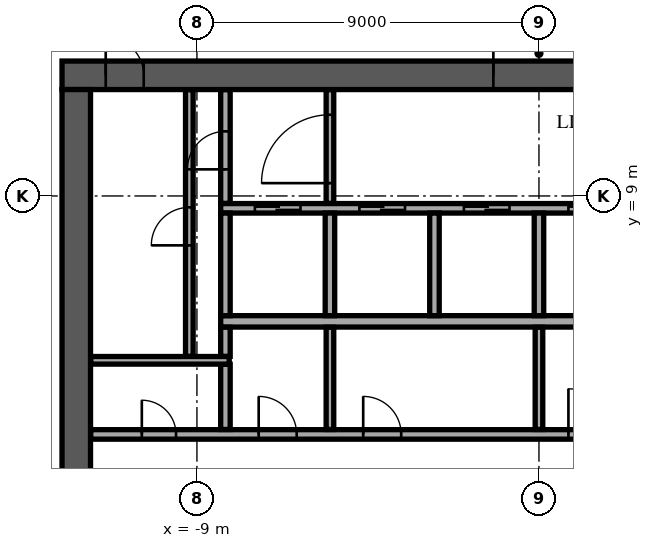
"""IFC4 building model, lengths in metres.
Left out: names, types, materials, properties, quantities, classifications, styles, units other than length and angle.
Written with IfcOpenShell. Run it as: python <this file> out.ifc"""

import sys

from ifc_helpers import new_model, si_unit, direction, frame, frame_2d, origin, place, context, subcontext, project, spatial, rectangle, extrude, element, fill, save


model = new_model("IFC4")
c1 = context("Model", 3, precision=1e-05, world=origin(), true_north=direction((0.0, 1.0)))
c2 = subcontext(c1, "Body", "Model", "MODEL_VIEW")
j1 = project(units=[si_unit("LENGTHUNIT", "METRE"), si_unit("PLANEANGLEUNIT", "RADIAN")], contexts=[c1])
p1 = place(None, origin())
s1 = spatial("IfcSite", under=j1, at=p1, CompositionType="ELEMENT")
p2 = place(p1, origin())
s2 = spatial("IfcBuilding", under=s1, at=p2, CompositionType="ELEMENT")
p3 = place(p2, frame((0.0, 0.0, 282.9)))
s3 = spatial("IfcBuildingStorey", under=s2, at=p3, CompositionType="ELEMENT", Elevation=282.9)
p4 = place(p3, frame((-12.55, 12.175, 0.0), z_axis=(0.0, 0.0, 1.0), x_axis=(1.0, 0.0, 0.0)))
e1 = element("IfcWall", 1, at=p4, inside=s3, PredefinedType="SHEAR", context=c2, shape_type="SweptSolid", body=[
    extrude(rectangle(XDim=25.1, YDim=0.75, at=frame_2d((12.55, 0.0))), origin(), (0.0, 0.0, 1.0), 3.64),
])
p5 = place(p4, frame((11.35, 0.0, 0.0)))
e2 = element("IfcOpeningElement", 2, at=p5, cuts=e1, PredefinedType="OPENING", context=c2, shape_type="SweptSolid", body=[
    extrude(rectangle(XDim=2.4, YDim=2.4, at=frame_2d((1.2, 1.2))), frame((0.0, 0.385, 0.0), z_axis=(0.0, -1.0, 0.0), x_axis=(1.0, 0.0, 0.0)), (0.0, 0.0, 1.0), 0.77),
])
p6 = place(p4, frame((22.175, 0.0, 0.0)))
e3 = element("IfcOpeningElement", 3, at=p6, cuts=e1, PredefinedType="OPENING", context=c2, shape_type="SweptSolid", body=[
    extrude(rectangle(XDim=1.2, YDim=2.1, at=frame_2d((0.6, 1.05))), frame((0.0, 0.385, 0.0), z_axis=(0.0, -1.0, 0.0), x_axis=(1.0, 0.0, 0.0)), (0.0, 0.0, 1.0), 0.77),
])
p7 = place(p4, frame((1.15, 0.0, 0.0)))
e4 = element("IfcOpeningElement", 4, at=p7, cuts=e1, PredefinedType="OPENING", context=c2, shape_type="SweptSolid", body=[
    extrude(rectangle(XDim=1.0, YDim=2.1, at=frame_2d((0.5, 1.05))), frame((0.0, 0.385, 0.0), z_axis=(0.0, -1.0, 0.0), x_axis=(1.0, 0.0, 0.0)), (0.0, 0.0, 1.0), 0.77),
])
p8 = place(p3, frame((-12.175, -11.8, 0.0), z_axis=(0.0, 0.0, 1.0), x_axis=(0.0, 1.0, 0.0)))
e5 = element("IfcWall", 5, at=p8, inside=s3, PredefinedType="SHEAR", context=c2, shape_type="SweptSolid", body=[
    extrude(rectangle(XDim=23.6, YDim=0.75, at=frame_2d((11.8, 0.0))), origin(), (0.0, 0.0, 1.0), 3.64),
])
p9 = place(p8, frame((10.6, 0.0, 0.0)))
e6 = element("IfcOpeningElement", 6, at=p9, cuts=e5, PredefinedType="OPENING", context=c2, shape_type="SweptSolid", body=[
    extrude(rectangle(XDim=2.4, YDim=2.4, at=frame_2d((1.2, 1.2))), frame((0.0, 0.385, 0.0), z_axis=(0.0, -1.0, 0.0), x_axis=(1.0, 0.0, 0.0)), (0.0, 0.0, 1.0), 0.77),
])
p10 = place(p3, frame((-8.375, 5.7, 0.0), z_axis=(0.0, 0.0, 1.0), x_axis=(1.0, 0.0, 0.0)))
e7 = element("IfcWall", 7, at=p10, inside=s3, PredefinedType="SOLIDWALL", context=c2, shape_type="SweptSolid", body=[
    extrude(rectangle(XDim=16.75, YDim=0.3, at=frame_2d((8.375, 0.0))), origin(), (0.0, 0.0, 1.0), 3.64),
])
p11 = place(p3, frame((-8.375, 8.675, 0.0), z_axis=(0.0, 0.0, 1.0), x_axis=(1.0, 0.0, 0.0)))
e8 = element("IfcWall", 8, at=p11, inside=s3, PredefinedType="SOLIDWALL", context=c2, shape_type="SweptSolid", body=[
    extrude(rectangle(XDim=16.75, YDim=0.25, at=frame_2d((8.375, 0.0))), origin(), (0.0, 0.0, 1.0), 3.64),
])
p12 = place(p11, frame((0.9, 0.0, 0.0)))
e9 = element("IfcOpeningElement", 9, at=p12, cuts=e8, PredefinedType="OPENING", context=c2, shape_type="SweptSolid", body=[
    extrude(rectangle(XDim=1.2, YDim=2.1, at=frame_2d((0.6, 1.05))), frame((0.0, 0.135, 0.0), z_axis=(0.0, -1.0, 0.0), x_axis=(1.0, 0.0, 0.0)), (0.0, 0.0, 1.0), 0.27),
])
p13 = place(p11, frame((3.65, 0.0, 0.0)))
e10 = element("IfcOpeningElement", 10, at=p13, cuts=e8, PredefinedType="OPENING", context=c2, shape_type="SweptSolid", body=[
    extrude(rectangle(XDim=1.2, YDim=2.1, at=frame_2d((0.6, 1.05))), frame((0.0, 0.135, 0.0), z_axis=(0.0, -1.0, 0.0), x_axis=(1.0, 0.0, 0.0)), (0.0, 0.0, 1.0), 0.27),
])
p14 = place(p11, frame((6.4, 0.0, 0.0)))
e11 = element("IfcOpeningElement", 11, at=p14, cuts=e8, PredefinedType="OPENING", context=c2, shape_type="SweptSolid", body=[
    extrude(rectangle(XDim=1.2, YDim=2.1, at=frame_2d((0.6, 1.05))), frame((0.0, 0.135, 0.0), z_axis=(0.0, -1.0, 0.0), x_axis=(1.0, 0.0, 0.0)), (0.0, 0.0, 1.0), 0.27),
])
p15 = place(p11, frame((9.15, 0.0, 0.0)))
e12 = element("IfcOpeningElement", 12, at=p15, cuts=e8, PredefinedType="OPENING", context=c2, shape_type="SweptSolid", body=[
    extrude(rectangle(XDim=1.2, YDim=2.1, at=frame_2d((0.6, 1.05))), frame((0.0, 0.135, 0.0), z_axis=(0.0, -1.0, 0.0), x_axis=(1.0, 0.0, 0.0)), (0.0, 0.0, 1.0), 0.27),
])
p16 = place(p11, frame((11.9, 0.0, 0.0)))
e13 = element("IfcOpeningElement", 13, at=p16, cuts=e8, PredefinedType="OPENING", context=c2, shape_type="SweptSolid", body=[
    extrude(rectangle(XDim=1.2, YDim=2.1, at=frame_2d((0.6, 1.05))), frame((0.0, 0.135, 0.0), z_axis=(0.0, -1.0, 0.0), x_axis=(1.0, 0.0, 0.0)), (0.0, 0.0, 1.0), 0.27),
])
p17 = place(p11, frame((14.65, 0.0, 0.0)))
e14 = element("IfcOpeningElement", 14, at=p17, cuts=e8, PredefinedType="OPENING", context=c2, shape_type="SweptSolid", body=[
    extrude(rectangle(XDim=1.2, YDim=2.1, at=frame_2d((0.6, 1.05))), frame((0.0, 0.135, 0.0), z_axis=(0.0, -1.0, 0.0), x_axis=(1.0, 0.0, 0.0)), (0.0, 0.0, 1.0), 0.27),
])
for number, where, z_axis, x_axis in (
    (15, (-8.25, 5.85, 0.0), (0.0, 0.0, 1.0), (0.0, 1.0, 0.0)),
    (16, (-5.5, 5.85, 0.0), (0.0, 0.0, 1.0), (0.0, 1.0, 0.0)),
    (17, (-2.75, 5.85, 0.0), (0.0, 0.0, 1.0), (0.0, 1.0, 0.0)),
    (18, (0.0, 5.85, 0.0), (0.0, 0.0, 1.0), (0.0, 1.0, 0.0)),
):
    element("IfcWall", number, at=place(p3, frame(where, z_axis=z_axis, x_axis=x_axis)), inside=s3, PredefinedType="SOLIDWALL", context=c2, shape_type="SweptSolid", body=[
        extrude(rectangle(XDim=2.7, YDim=0.25, at=frame_2d((1.35, 0.0))), origin(), (0.0, 0.0, 1.0), 3.64),
    ])
p18 = place(p3, frame((-11.795, 2.725, 0.0), z_axis=(0.0, 0.0, 1.0), x_axis=(1.0, 0.0, 0.0)))
e19 = element("IfcWall", 19, at=p18, inside=s3, PredefinedType="PARTITIONING", context=c2, shape_type="SweptSolid", body=[
    extrude(rectangle(XDim=23.59, YDim=0.25, at=frame_2d((11.795, 0.0))), origin(), (0.0, 0.0, 1.0), 3.64),
])
p19 = place(p18, frame((21.345, 0.0, 0.0)))
e20 = element("IfcOpeningElement", 20, at=p19, cuts=e19, PredefinedType="OPENING", context=c2, shape_type="SweptSolid", body=[
    extrude(rectangle(XDim=0.9, YDim=2.1, at=frame_2d((0.45, 1.05))), frame((0.0, 0.135, 0.0), z_axis=(0.0, -1.0, 0.0), x_axis=(1.0, 0.0, 0.0)), (0.0, 0.0, 1.0), 0.27),
])
p20 = place(p18, frame((1.345, 0.0, 0.0)))
e21 = element("IfcOpeningElement", 21, at=p20, cuts=e19, PredefinedType="OPENING", context=c2, shape_type="SweptSolid", body=[
    extrude(rectangle(XDim=0.9, YDim=2.1, at=frame_2d((0.45, 1.05))), frame((0.0, 0.135, 0.0), z_axis=(0.0, -1.0, 0.0), x_axis=(1.0, 0.0, 0.0)), (0.0, 0.0, 1.0), 0.27),
])
p21 = place(p18, frame((4.42, 0.0, 0.0)))
e22 = element("IfcOpeningElement", 22, at=p21, cuts=e19, PredefinedType="OPENING", context=c2, shape_type="SweptSolid", body=[
    extrude(rectangle(XDim=1.0, YDim=2.1, at=frame_2d((0.5, 1.05))), frame((0.0, 0.135, 0.0), z_axis=(0.0, -1.0, 0.0), x_axis=(1.0, 0.0, 0.0)), (0.0, 0.0, 1.0), 0.27),
])
p22 = place(p18, frame((7.17, 0.0, 0.0)))
e23 = element("IfcOpeningElement", 23, at=p22, cuts=e19, PredefinedType="OPENING", context=c2, shape_type="SweptSolid", body=[
    extrude(rectangle(XDim=1.0, YDim=2.1, at=frame_2d((0.5, 1.05))), frame((0.0, 0.135, 0.0), z_axis=(0.0, -1.0, 0.0), x_axis=(1.0, 0.0, 0.0)), (0.0, 0.0, 1.0), 0.27),
])
p23 = place(p18, frame((12.57, 0.0, 0.0)))
e24 = element("IfcOpeningElement", 24, at=p23, cuts=e19, PredefinedType="OPENING", context=c2, shape_type="SweptSolid", body=[
    extrude(rectangle(XDim=1.2, YDim=2.1, at=frame_2d((0.6, 1.05))), frame((0.0, 0.135, 0.0), z_axis=(0.0, -1.0, 0.0), x_axis=(1.0, 0.0, 0.0)), (0.0, 0.0, 1.0), 0.27),
])
p24 = place(p3, frame((-8.25, 2.855, 0.0), z_axis=(0.0, 0.0, 1.0), x_axis=(0.0, 1.0, 0.0)))
e25 = element("IfcWall", 25, at=p24, inside=s3, PredefinedType="PARTITIONING", context=c2, shape_type="SweptSolid", body=[
    extrude(rectangle(XDim=1.715, YDim=0.25, at=frame_2d((0.857, 0.0))), origin(), (0.0, 0.0, 1.0), 3.64),
])
for number, where, z_axis, x_axis in (
    (26, (-5.5, 2.855, 0.0), (0.0, 0.0, 1.0), (0.0, 1.0, 0.0)),
    (27, (0.0, 2.855, 0.0), (0.0, 0.0, 1.0), (0.0, 1.0, 0.0)),
):
    element("IfcWall", number, at=place(p3, frame(where, z_axis=z_axis, x_axis=x_axis)), inside=s3, PredefinedType="PARTITIONING", context=c2, shape_type="SweptSolid", body=[
        extrude(rectangle(XDim=2.69, YDim=0.2, at=frame_2d((1.345, 0.0))), origin(), (0.0, 0.0, 1.0), 3.64),
    ])
p25 = place(p3, frame((-11.795, 4.675, 0.0), z_axis=(0.0, 0.0, 1.0), x_axis=(1.0, 0.0, 0.0)))
e28 = element("IfcWall", 28, at=p25, inside=s3, PredefinedType="PARTITIONING", context=c2, shape_type="SweptSolid", body=[
    extrude(rectangle(XDim=3.645, YDim=0.2, at=frame_2d((1.823, 0.0))), origin(), (0.0, 0.0, 1.0), 3.64),
])
p26 = place(p3, frame((-9.2, 4.78, 0.0), z_axis=(0.0, 0.0, 1.0), x_axis=(0.0, 1.0, 0.0)))
e29 = element("IfcWall", 29, at=p26, inside=s3, PredefinedType="PARTITIONING", context=c2, shape_type="SweptSolid", body=[
    extrude(rectangle(XDim=7.015, YDim=0.2, at=frame_2d((3.507, 0.0))), origin(), (0.0, 0.0, 1.0), 3.64),
])
p27 = place(p26, frame((2.92, 0.0, 0.0)))
e30 = element("IfcOpeningElement", 30, at=p27, cuts=e29, PredefinedType="OPENING", context=c2, shape_type="SweptSolid", body=[
    extrude(rectangle(XDim=1.0, YDim=2.1, at=frame_2d((0.5, 1.05))), frame((0.0, 0.11, 0.0), z_axis=(0.0, -1.0, 0.0), x_axis=(1.0, 0.0, 0.0)), (0.0, 0.0, 1.0), 0.22),
])
p28 = place(p3, frame((-8.25, 4.78, 0.0), z_axis=(0.0, 0.0, 1.0), x_axis=(0.0, 1.0, 0.0)))
e31 = element("IfcWall", 31, at=p28, inside=s3, PredefinedType="PARTITIONING", context=c2, shape_type="SweptSolid", body=[
    extrude(rectangle(XDim=0.765, YDim=0.25, at=frame_2d((0.382, 0.0))), origin(), (0.0, 0.0, 1.0), 3.64),
])
p29 = place(p3, frame((-8.25, 8.805, 0.0), z_axis=(0.0, 0.0, 1.0), x_axis=(0.0, 1.0, 0.0)))
e32 = element("IfcWall", 32, at=p29, inside=s3, PredefinedType="PARTITIONING", context=c2, shape_type="SweptSolid", body=[
    extrude(rectangle(XDim=2.99, YDim=0.25, at=frame_2d((1.495, 0.0))), origin(), (0.0, 0.0, 1.0), 3.64),
])
p30 = place(p29, frame((0.895, 0.0, 0.0)))
e33 = element("IfcOpeningElement", 33, at=p30, cuts=e32, PredefinedType="OPENING", context=c2, shape_type="SweptSolid", body=[
    extrude(rectangle(XDim=1.0, YDim=2.1, at=frame_2d((0.5, 1.05))), frame((0.0, 0.135, 0.0), z_axis=(0.0, -1.0, 0.0), x_axis=(1.0, 0.0, 0.0)), (0.0, 0.0, 1.0), 0.27),
])
p31 = place(p3, frame((-5.5, 8.805, 0.0), z_axis=(0.0, 0.0, 1.0), x_axis=(0.0, 1.0, 0.0)))
e34 = element("IfcWall", 34, at=p31, inside=s3, PredefinedType="PARTITIONING", context=c2, shape_type="SweptSolid", body=[
    extrude(rectangle(XDim=2.99, YDim=0.2, at=frame_2d((1.495, 0.0))), origin(), (0.0, 0.0, 1.0), 3.64),
])
p32 = place(p31, frame((0.532, 0.0, 0.0)))
e35 = element("IfcOpeningElement", 35, at=p32, cuts=e34, PredefinedType="OPENING", context=c2, shape_type="SweptSolid", body=[
    extrude(rectangle(XDim=1.8, YDim=2.1, at=frame_2d((0.9, 1.05))), frame((0.0, 0.11, 0.0), z_axis=(0.0, -1.0, 0.0), x_axis=(1.0, 0.0, 0.0)), (0.0, 0.0, 1.0), 0.22),
])
p33 = place(p3, frame((-10.292, 32.278, 0.0), z_axis=(0.0, 0.0, 1.0), x_axis=(-0.438370550468, -0.898794337144, 0.0)))
e36 = element("IfcWall", 36, at=p33, inside=s3, PredefinedType="STANDARD", context=c2, shape_type="SweptSolid", body=[
    extrude(rectangle(XDim=48.843, YDim=0.6, at=frame_2d((24.421, 0.0))), origin(), (0.0, 0.0, 1.0), 3.64),
])
p34 = place(p33, frame((1.22, 0.0, 0.9)))
e37 = element("IfcOpeningElement", 37, at=p34, cuts=e36, PredefinedType="OPENING", context=c2, shape_type="SweptSolid", body=[
    extrude(rectangle(XDim=2.0, YDim=2.1, at=frame_2d((1.0, 1.05))), frame((0.0, 0.31, 0.0), z_axis=(0.0, -1.0, 0.0), x_axis=(1.0, 0.0, 0.0)), (0.0, 0.0, 1.0), 0.62),
])
p35 = place(p33, frame((5.66, 0.0, 0.9)))
e38 = element("IfcOpeningElement", 38, at=p35, cuts=e36, PredefinedType="OPENING", context=c2, shape_type="SweptSolid", body=[
    extrude(rectangle(XDim=2.0, YDim=2.1, at=frame_2d((1.0, 1.05))), frame((0.0, 0.31, 0.0), z_axis=(0.0, -1.0, 0.0), x_axis=(1.0, 0.0, 0.0)), (0.0, 0.0, 1.0), 0.62),
])
p36 = place(p33, frame((10.101, 0.0, 0.9)))
e39 = element("IfcOpeningElement", 39, at=p36, cuts=e36, PredefinedType="OPENING", context=c2, shape_type="SweptSolid", body=[
    extrude(rectangle(XDim=2.0, YDim=2.1, at=frame_2d((1.0, 1.05))), frame((0.0, 0.31, 0.0), z_axis=(0.0, -1.0, 0.0), x_axis=(1.0, 0.0, 0.0)), (0.0, 0.0, 1.0), 0.62),
])
p37 = place(p33, frame((14.541, 0.0, 0.9)))
e40 = element("IfcOpeningElement", 40, at=p37, cuts=e36, PredefinedType="OPENING", context=c2, shape_type="SweptSolid", body=[
    extrude(rectangle(XDim=2.0, YDim=2.1, at=frame_2d((1.0, 1.05))), frame((0.0, 0.31, 0.0), z_axis=(0.0, -1.0, 0.0), x_axis=(1.0, 0.0, 0.0)), (0.0, 0.0, 1.0), 0.62),
])
p38 = place(p33, frame((18.981, 0.0, 0.9)))
e41 = element("IfcOpeningElement", 41, at=p38, cuts=e36, PredefinedType="OPENING", context=c2, shape_type="SweptSolid", body=[
    extrude(rectangle(XDim=2.0, YDim=2.1, at=frame_2d((1.0, 1.05))), frame((0.0, 0.31, 0.0), z_axis=(0.0, -1.0, 0.0), x_axis=(1.0, 0.0, 0.0)), (0.0, 0.0, 1.0), 0.62),
])
p39 = place(p33, frame((23.422, 0.0, 0.9)))
e42 = element("IfcOpeningElement", 42, at=p39, cuts=e36, PredefinedType="OPENING", context=c2, shape_type="SweptSolid", body=[
    extrude(rectangle(XDim=2.0, YDim=2.1, at=frame_2d((1.0, 1.05))), frame((0.0, 0.31, 0.0), z_axis=(0.0, -1.0, 0.0), x_axis=(1.0, 0.0, 0.0)), (0.0, 0.0, 1.0), 0.62),
])
p40 = place(p33, frame((27.862, 0.0, 0.9)))
e43 = element("IfcOpeningElement", 43, at=p40, cuts=e36, PredefinedType="OPENING", context=c2, shape_type="SweptSolid", body=[
    extrude(rectangle(XDim=2.0, YDim=2.1, at=frame_2d((1.0, 1.05))), frame((0.0, 0.31, 0.0), z_axis=(0.0, -1.0, 0.0), x_axis=(1.0, 0.0, 0.0)), (0.0, 0.0, 1.0), 0.62),
])
p41 = place(p33, frame((32.302, 0.0, 0.9)))
e44 = element("IfcOpeningElement", 44, at=p41, cuts=e36, PredefinedType="OPENING", context=c2, shape_type="SweptSolid", body=[
    extrude(rectangle(XDim=2.0, YDim=2.1, at=frame_2d((1.0, 1.05))), frame((0.0, 0.31, 0.0), z_axis=(0.0, -1.0, 0.0), x_axis=(1.0, 0.0, 0.0)), (0.0, 0.0, 1.0), 0.62),
])
p42 = place(p33, frame((36.742, 0.0, 0.9)))
e45 = element("IfcOpeningElement", 45, at=p42, cuts=e36, PredefinedType="OPENING", context=c2, shape_type="SweptSolid", body=[
    extrude(rectangle(XDim=2.0, YDim=2.1, at=frame_2d((1.0, 1.05))), frame((0.0, 0.31, 0.0), z_axis=(0.0, -1.0, 0.0), x_axis=(1.0, 0.0, 0.0)), (0.0, 0.0, 1.0), 0.62),
])
p43 = place(p33, frame((41.183, 0.0, 0.9)))
e46 = element("IfcOpeningElement", 46, at=p43, cuts=e36, PredefinedType="OPENING", context=c2, shape_type="SweptSolid", body=[
    extrude(rectangle(XDim=2.0, YDim=2.1, at=frame_2d((1.0, 1.05))), frame((0.0, 0.31, 0.0), z_axis=(0.0, -1.0, 0.0), x_axis=(1.0, 0.0, 0.0)), (0.0, 0.0, 1.0), 0.62),
])
p44 = place(p33, frame((45.623, 0.0, 0.9)))
e47 = element("IfcOpeningElement", 47, at=p44, cuts=e36, PredefinedType="OPENING", context=c2, shape_type="SweptSolid", body=[
    extrude(rectangle(XDim=2.0, YDim=2.1, at=frame_2d((1.0, 1.05))), frame((0.0, 0.31, 0.0), z_axis=(0.0, -1.0, 0.0), x_axis=(1.0, 0.0, 0.0)), (0.0, 0.0, 1.0), 0.62),
])
p45 = place(p3, frame((-9.104, 26.104, 0.0), z_axis=(0.0, 0.0, 1.0), x_axis=(0.898795233888, -0.438368711864, 0.0)))
e48 = element("IfcWall", 48, at=p45, inside=s3, PredefinedType="PARTITIONING", context=c2, shape_type="SweptSolid", body=[
    extrude(rectangle(XDim=39.325, YDim=0.15, at=frame_2d((19.663, 0.0))), origin(), (0.0, 0.0, 1.0), 3.04),
])
p46 = place(p45, frame((2.8, 0.0, 0.0)))
e49 = element("IfcOpeningElement", 49, at=p46, cuts=e48, PredefinedType="OPENING", context=c2, shape_type="SweptSolid", body=[
    extrude(rectangle(XDim=1.8, YDim=2.1, at=frame_2d((0.9, 1.05))), frame((0.0, 0.085, 0.0), z_axis=(0.0, -1.0, 0.0), x_axis=(1.0, 0.0, 0.0)), (0.0, 0.0, 1.0), 0.17),
])
p47 = place(p45, frame((15.419, 0.0, 0.0)))
e50 = element("IfcOpeningElement", 50, at=p47, cuts=e48, PredefinedType="OPENING", context=c2, shape_type="SweptSolid", body=[
    extrude(rectangle(XDim=1.0, YDim=2.1, at=frame_2d((0.5, 1.05))), frame((0.0, 0.085, 0.0), z_axis=(0.0, -1.0, 0.0), x_axis=(1.0, 0.0, 0.0)), (0.0, 0.0, 1.0), 0.17),
])
p48 = place(p45, frame((19.371, 0.0, 0.0)))
e51 = element("IfcOpeningElement", 51, at=p48, cuts=e48, PredefinedType="OPENING", context=c2, shape_type="SweptSolid", body=[
    extrude(rectangle(XDim=1.0, YDim=2.1, at=frame_2d((0.5, 1.05))), frame((0.0, 0.085, 0.0), z_axis=(0.0, -1.0, 0.0), x_axis=(1.0, 0.0, 0.0)), (0.0, 0.0, 1.0), 0.17),
])
p49 = place(p5, origin())
e52 = element("IfcDoor", 52, at=p49, inside=s3, OperationType="SINGLE_SWING_LEFT", PredefinedType="DOOR", context=c2, shape_type="SweptSolid", body=[
    extrude(rectangle(XDim=2.4, YDim=2.4, at=frame_2d((1.2, 1.2))), frame((0.0, 0.025, 0.0), z_axis=(0.0, -1.0, 0.0), x_axis=(1.0, 0.0, 0.0)), (0.0, 0.0, 1.0), 0.05),
])
fill(e2, e52)
p50 = place(p7, origin())
e53 = element("IfcDoor", 53, at=p50, inside=s3, OperationType="SINGLE_SWING_LEFT", PredefinedType="DOOR", context=c2, shape_type="SweptSolid", body=[
    extrude(rectangle(XDim=1.0, YDim=2.1, at=frame_2d((0.5, 1.05))), frame((0.0, 0.025, 0.0), z_axis=(0.0, -1.0, 0.0), x_axis=(1.0, 0.0, 0.0)), (0.0, 0.0, 1.0), 0.05),
])
fill(e4, e53)
p51 = place(p12, origin())
e54 = element("IfcDoor", 54, at=p51, inside=s3, OperationType="DOUBLE_DOOR_SLIDING", PredefinedType="DOOR", context=c2, shape_type="SweptSolid", body=[
    extrude(rectangle(XDim=1.2, YDim=2.1, at=frame_2d((0.6, 1.05))), frame((0.0, 0.025, 0.0), z_axis=(0.0, -1.0, 0.0), x_axis=(1.0, 0.0, 0.0)), (0.0, 0.0, 1.0), 0.05),
])
fill(e9, e54)
p52 = place(p13, origin())
e55 = element("IfcDoor", 55, at=p52, inside=s3, OperationType="DOUBLE_DOOR_SLIDING", PredefinedType="DOOR", context=c2, shape_type="SweptSolid", body=[
    extrude(rectangle(XDim=1.2, YDim=2.1, at=frame_2d((0.6, 1.05))), frame((0.0, 0.025, 0.0), z_axis=(0.0, -1.0, 0.0), x_axis=(1.0, 0.0, 0.0)), (0.0, 0.0, 1.0), 0.05),
])
fill(e10, e55)
p53 = place(p14, origin())
e56 = element("IfcDoor", 56, at=p53, inside=s3, OperationType="DOUBLE_DOOR_SLIDING", PredefinedType="DOOR", context=c2, shape_type="SweptSolid", body=[
    extrude(rectangle(XDim=1.2, YDim=2.1, at=frame_2d((0.6, 1.05))), frame((0.0, 0.025, 0.0), z_axis=(0.0, -1.0, 0.0), x_axis=(1.0, 0.0, 0.0)), (0.0, 0.0, 1.0), 0.05),
])
fill(e11, e56)
p54 = place(p15, origin())
e57 = element("IfcDoor", 57, at=p54, inside=s3, OperationType="DOUBLE_DOOR_SLIDING", PredefinedType="DOOR", context=c2, shape_type="SweptSolid", body=[
    extrude(rectangle(XDim=1.2, YDim=2.1, at=frame_2d((0.6, 1.05))), frame((0.0, 0.025, 0.0), z_axis=(0.0, -1.0, 0.0), x_axis=(1.0, 0.0, 0.0)), (0.0, 0.0, 1.0), 0.05),
])
fill(e12, e57)
p55 = place(p20, origin())
e58 = element("IfcDoor", 58, at=p55, inside=s3, OperationType="SINGLE_SWING_RIGHT", PredefinedType="DOOR", context=c2, shape_type="SweptSolid", body=[
    extrude(rectangle(XDim=0.9, YDim=2.1, at=frame_2d((0.45, 1.05))), frame((0.0, 0.025, 0.0), z_axis=(0.0, -1.0, 0.0), x_axis=(1.0, 0.0, 0.0)), (0.0, 0.0, 1.0), 0.05),
])
fill(e21, e58)
p56 = place(p27, origin())
e59 = element("IfcDoor", 59, at=p56, inside=s3, OperationType="SINGLE_SWING_RIGHT", PredefinedType="DOOR", context=c2, shape_type="SweptSolid", body=[
    extrude(rectangle(XDim=1.0, YDim=2.1, at=frame_2d((0.5, 1.05))), frame((0.0, 0.025, 0.0), z_axis=(0.0, -1.0, 0.0), x_axis=(1.0, 0.0, 0.0)), (0.0, 0.0, 1.0), 0.05),
])
fill(e30, e59)
p57 = place(p30, origin())
e60 = element("IfcDoor", 60, at=p57, inside=s3, OperationType="SINGLE_SWING_RIGHT", PredefinedType="DOOR", context=c2, shape_type="SweptSolid", body=[
    extrude(rectangle(XDim=1.0, YDim=2.1, at=frame_2d((0.5, 1.05))), frame((0.0, 0.025, 0.0), z_axis=(0.0, -1.0, 0.0), x_axis=(1.0, 0.0, 0.0)), (0.0, 0.0, 1.0), 0.05),
])
fill(e33, e60)
p58 = place(p21, origin())
e61 = element("IfcDoor", 61, at=p58, inside=s3, OperationType="SINGLE_SWING_RIGHT", PredefinedType="DOOR", context=c2, shape_type="SweptSolid", body=[
    extrude(rectangle(XDim=1.0, YDim=2.1, at=frame_2d((0.5, 1.05))), frame((0.0, 0.025, 0.0), z_axis=(0.0, -1.0, 0.0), x_axis=(1.0, 0.0, 0.0)), (0.0, 0.0, 1.0), 0.05),
])
fill(e22, e61)
p59 = place(p22, origin())
e62 = element("IfcDoor", 62, at=p59, inside=s3, OperationType="SINGLE_SWING_RIGHT", PredefinedType="DOOR", context=c2, shape_type="SweptSolid", body=[
    extrude(rectangle(XDim=1.0, YDim=2.1, at=frame_2d((0.5, 1.05))), frame((0.0, 0.025, 0.0), z_axis=(0.0, -1.0, 0.0), x_axis=(1.0, 0.0, 0.0)), (0.0, 0.0, 1.0), 0.05),
])
fill(e23, e62)
p60 = place(p23, origin())
e63 = element("IfcDoor", 63, at=p60, inside=s3, OperationType="SINGLE_SWING_LEFT", PredefinedType="DOOR", context=c2, shape_type="SweptSolid", body=[
    extrude(rectangle(XDim=1.2, YDim=2.1, at=frame_2d((0.6, 1.05))), frame((0.0, 0.025, 0.0), z_axis=(0.0, -1.0, 0.0), x_axis=(1.0, 0.0, 0.0)), (0.0, 0.0, 1.0), 0.05),
])
fill(e24, e63)
p61 = place(p32, origin())
e64 = element("IfcDoor", 64, at=p61, inside=s3, OperationType="SINGLE_SWING_LEFT", PredefinedType="DOOR", context=c2, shape_type="SweptSolid", body=[
    extrude(rectangle(XDim=1.8, YDim=2.1, at=frame_2d((0.9, 1.05))), frame((0.0, 0.025, 0.0), z_axis=(0.0, -1.0, 0.0), x_axis=(1.0, 0.0, 0.0)), (0.0, 0.0, 1.0), 0.05),
])
fill(e35, e64)
save(model, sys.argv[1])
